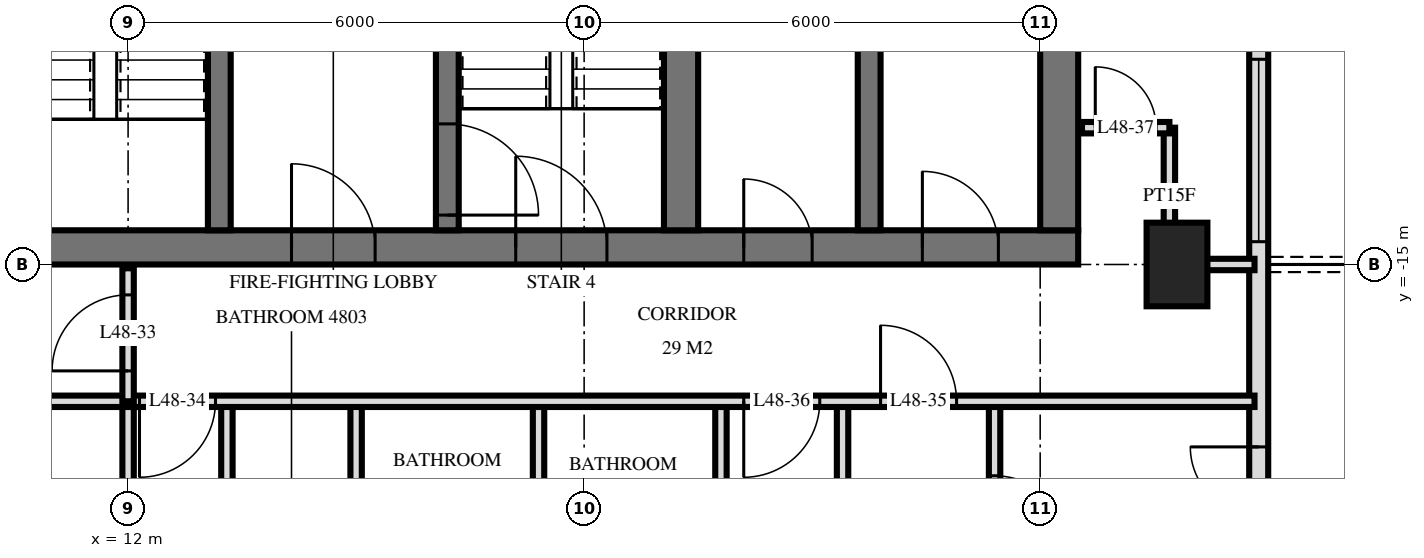
"""IFC4 building model, lengths in metres.
Left out: names, types, materials, properties, quantities, classifications, styles, units other than length and angle.
Written with IfcOpenShell. Run it as: python <this file> out.ifc"""

import sys

from ifc_helpers import new_model, si_unit, direction, frame, frame_2d, origin, origin_2d, place, context, subcontext, project, spatial, rectangle, extrude, element, fill, save


model = new_model("IFC4")
c1 = context("Model", 3, precision=1e-05, world=origin(), true_north=direction((0.0, 1.0)))
c2 = subcontext(c1, "Body", "Model", "MODEL_VIEW")
j1 = project(units=[si_unit("LENGTHUNIT", "METRE"), si_unit("PLANEANGLEUNIT", "RADIAN")], contexts=[c1])
p1 = place(None, origin())
s1 = spatial("IfcSite", under=j1, at=p1, CompositionType="ELEMENT")
p2 = place(p1, origin())
s2 = spatial("IfcBuilding", under=s1, at=p2, CompositionType="ELEMENT")
p3 = place(p2, frame((0.0, 0.0, 187.1)))
s3 = spatial("IfcBuildingStorey", under=s2, at=p3, CompositionType="ELEMENT", Elevation=187.1)
p4 = place(p3, frame((25.8, -15.0, 0.0), z_axis=(0.0, 0.0, 1.0), x_axis=(0.0, 1.0, 0.0)))
e1 = element("IfcColumn", 1, at=p4, inside=s3, PredefinedType="COLUMN", context=c2, shape_type="SweptSolid", body=[
    extrude(rectangle(XDim=1.1, YDim=0.8, at=origin_2d()), origin(), (0.0, 0.0, 1.0), 3.5),
])
p5 = place(p3, frame((10.0, -14.775, 0.0), z_axis=(0.0, 0.0, 1.0), x_axis=(1.0, 0.0, 0.0)))
e2 = element("IfcWall", 2, at=p5, inside=s3, PredefinedType="SHEAR", context=c2, shape_type="SweptSolid", body=[
    extrude(rectangle(XDim=14.5, YDim=0.45, at=frame_2d((7.25, 0.0))), origin(), (0.0, 0.0, 1.0), 3.5),
])
p6 = place(p5, frame((7.1, 0.0, 0.0)))
e3 = element("IfcOpeningElement", 3, at=p6, cuts=e2, PredefinedType="OPENING", context=c2, shape_type="SweptSolid", body=[
    extrude(rectangle(XDim=1.2, YDim=2.1, at=frame_2d((0.6, 1.05))), frame((0.0, 0.235, 0.0), z_axis=(0.0, -1.0, 0.0), x_axis=(1.0, 0.0, 0.0)), (0.0, 0.0, 1.0), 0.47),
])
p7 = place(p5, frame((4.15, 0.0, 0.0)))
e4 = element("IfcOpeningElement", 4, at=p7, cuts=e2, PredefinedType="OPENING", context=c2, shape_type="SweptSolid", body=[
    extrude(rectangle(XDim=1.1, YDim=2.1, at=frame_2d((0.55, 1.05))), frame((0.0, 0.235, 0.0), z_axis=(0.0, -1.0, 0.0), x_axis=(1.0, 0.0, 0.0)), (0.0, 0.0, 1.0), 0.47),
])
p8 = place(p5, frame((10.1, 0.0, 0.0)))
e5 = element("IfcOpeningElement", 5, at=p8, cuts=e2, PredefinedType="OPENING", context=c2, shape_type="SweptSolid", body=[
    extrude(rectangle(XDim=0.9, YDim=2.1, at=frame_2d((0.45, 1.05))), frame((0.0, 0.235, 0.0), z_axis=(0.0, -1.0, 0.0), x_axis=(1.0, 0.0, 0.0)), (0.0, 0.0, 1.0), 0.47),
])
p9 = place(p5, frame((12.45, 0.0, 0.0)))
e6 = element("IfcOpeningElement", 6, at=p9, cuts=e2, PredefinedType="OPENING", context=c2, shape_type="SweptSolid", body=[
    extrude(rectangle(XDim=1.0, YDim=2.1, at=frame_2d((0.5, 1.05))), frame((0.0, 0.235, 0.0), z_axis=(0.0, -1.0, 0.0), x_axis=(1.0, 0.0, 0.0)), (0.0, 0.0, 1.0), 0.47),
])
p10 = place(p3, frame((24.25, -14.55, 0.0), z_axis=(0.0, 0.0, 1.0), x_axis=(0.0, 1.0, 0.0)))
e7 = element("IfcWall", 7, at=p10, inside=s3, PredefinedType="SHEAR", context=c2, shape_type="SweptSolid", body=[
    extrude(rectangle(XDim=14.1, YDim=0.5, at=frame_2d((7.05, 0.0))), origin(), (0.0, 0.0, 1.0), 3.5),
])
p11 = place(p3, frame((13.2, -14.55, 0.0), z_axis=(0.0, 0.0, 1.0), x_axis=(0.0, 1.0, 0.0)))
e8 = element("IfcWall", 8, at=p11, inside=s3, PredefinedType="SHEAR", context=c2, shape_type="SweptSolid", body=[
    extrude(rectangle(XDim=5.4, YDim=0.3, at=frame_2d((2.7, 0.0))), origin(), (0.0, 0.0, 1.0), 3.5),
])
p12 = place(p11, frame((4.0, 0.0, 0.0)))
e9 = element("IfcOpeningElement", 9, at=p12, cuts=e8, PredefinedType="OPENING", context=c2, shape_type="SweptSolid", body=[
    extrude(rectangle(XDim=1.2, YDim=2.1, at=frame_2d((0.6, 1.05))), frame((0.0, 0.16, 0.0), z_axis=(0.0, -1.0, 0.0), x_axis=(1.0, 0.0, 0.0)), (0.0, 0.0, 1.0), 0.32),
])
p13 = place(p3, frame((16.2, -14.55, 0.0), z_axis=(0.0, 0.0, 1.0), x_axis=(0.0, 1.0, 0.0)))
e10 = element("IfcWall", 10, at=p13, inside=s3, PredefinedType="SHEAR", context=c2, shape_type="SweptSolid", body=[
    extrude(rectangle(XDim=5.4, YDim=0.3, at=frame_2d((2.7, 0.0))), origin(), (0.0, 0.0, 1.0), 3.5),
])
p14 = place(p13, frame((0.2, 0.0, 0.0)))
e11 = element("IfcOpeningElement", 11, at=p14, cuts=e10, PredefinedType="OPENING", context=c2, shape_type="SweptSolid", body=[
    extrude(rectangle(XDim=1.2, YDim=2.1, at=frame_2d((0.6, 1.05))), frame((0.0, 0.16, 0.0), z_axis=(0.0, -1.0, 0.0), x_axis=(1.0, 0.0, 0.0)), (0.0, 0.0, 1.0), 0.32),
])
p15 = place(p3, frame((19.275, -14.55, 0.0), z_axis=(0.0, 0.0, 1.0), x_axis=(0.0, 1.0, 0.0)))
e12 = element("IfcWall", 12, at=p15, inside=s3, PredefinedType="SHEAR", context=c2, shape_type="SweptSolid", body=[
    extrude(rectangle(XDim=5.4, YDim=0.45, at=frame_2d((2.7, 0.0))), origin(), (0.0, 0.0, 1.0), 3.5),
])
p16 = place(p3, frame((21.75, -14.55, 0.0), z_axis=(0.0, 0.0, 1.0), x_axis=(0.0, 1.0, 0.0)))
e13 = element("IfcWall", 13, at=p16, inside=s3, PredefinedType="SHEAR", context=c2, shape_type="SweptSolid", body=[
    extrude(rectangle(XDim=5.4, YDim=0.3, at=frame_2d((2.7, 0.0))), origin(), (0.0, 0.0, 1.0), 3.5),
])
p17 = place(p3, frame((26.875, -24.875, 0.0), z_axis=(0.0, 0.0, 1.0), x_axis=(0.0, 1.0, 0.0)))
e14 = element("IfcWall", 14, at=p17, inside=s3, PredefinedType="SOLIDWALL", context=c2, shape_type="SweptSolid", body=[
    extrude(rectangle(XDim=21.551, YDim=0.25, at=frame_2d((10.775, 0.0))), origin(), (0.0, 0.0, 1.0), 3.22),
])
p18 = place(p17, frame((0.575, 0.0, 0.0)))
e15 = element("IfcOpeningElement", 15, at=p18, cuts=e14, PredefinedType="OPENING", context=c2, shape_type="SweptSolid", body=[
    extrude(rectangle(XDim=1.8, YDim=2.4, at=frame_2d((0.9, 1.2))), frame((0.0, 0.135, 0.0), z_axis=(0.0, -1.0, 0.0), x_axis=(1.0, 0.0, 0.0)), (0.0, 0.0, 1.0), 0.27),
])
p19 = place(p17, frame((5.675, 0.0, 0.0)))
e16 = element("IfcOpeningElement", 16, at=p19, cuts=e14, PredefinedType="OPENING", context=c2, shape_type="SweptSolid", body=[
    extrude(rectangle(XDim=1.8, YDim=2.4, at=frame_2d((0.9, 1.2))), frame((0.0, 0.135, 0.0), z_axis=(0.0, -1.0, 0.0), x_axis=(1.0, 0.0, 0.0)), (0.0, 0.0, 1.0), 0.27),
])
p20 = place(p17, frame((10.175, 0.0, 0.9)))
e17 = element("IfcOpeningElement", 17, at=p20, cuts=e14, PredefinedType="OPENING", context=c2, shape_type="SweptSolid", body=[
    extrude(rectangle(XDim=2.4, YDim=1.5, at=frame_2d((1.2, 0.75))), frame((0.0, 0.135, 0.0), z_axis=(0.0, -1.0, 0.0), x_axis=(1.0, 0.0, 0.0)), (0.0, 0.0, 1.0), 0.27),
])
p21 = place(p17, frame((13.475, 0.0, 0.0)))
e18 = element("IfcOpeningElement", 18, at=p21, cuts=e14, PredefinedType="OPENING", context=c2, shape_type="SweptSolid", body=[
    extrude(rectangle(XDim=1.8, YDim=2.4, at=frame_2d((0.9, 1.2))), frame((0.0, 0.135, 0.0), z_axis=(0.0, -1.0, 0.0), x_axis=(1.0, 0.0, 0.0)), (0.0, 0.0, 1.0), 0.27),
])
p22 = place(p3, frame((25.7, -15.0, 0.0), z_axis=(0.0, 0.0, 1.0), x_axis=(0.0, 1.0, 0.0)))
e19 = element("IfcWall", 19, at=p22, inside=s3, PredefinedType="PARTITIONING", context=c2, shape_type="SweptSolid", body=[
    extrude(rectangle(XDim=1.8, YDim=0.15, at=frame_2d((0.9, 0.0))), origin(), (0.0, 0.0, 1.0), 3.22),
])
p23 = place(p3, frame((23.4, -19.8, 0.0), z_axis=(0.0, 0.0, 1.0), x_axis=(0.0, 1.0, 0.0)))
e20 = element("IfcWall", 20, at=p23, inside=s3, PredefinedType="PARTITIONING", context=c2, shape_type="SweptSolid", body=[
    extrude(rectangle(XDim=3.0, YDim=0.15, at=frame_2d((1.5, 0.0))), origin(), (0.0, 0.0, 1.0), 3.22),
])
p24 = place(p23, frame((1.02, 0.0, 0.0)))
e21 = element("IfcOpeningElement", 21, at=p24, cuts=e20, PredefinedType="OPENING", context=c2, shape_type="SweptSolid", body=[
    extrude(rectangle(XDim=1.0, YDim=2.1, at=frame_2d((0.5, 1.05))), frame((0.0, 0.085, 0.0), z_axis=(0.0, -1.0, 0.0), x_axis=(1.0, 0.0, 0.0)), (0.0, 0.0, 1.0), 0.17),
])
for number, where, z_axis, x_axis in (
    (22, (21.4, -19.8, 0.0), (0.0, 0.0, 1.0), (0.0, 1.0, 0.0)),
    (23, (19.8, -19.8, 0.0), (0.0, 0.0, 1.0), (0.0, 1.0, 0.0)),
    (24, (17.4, -19.8, 0.0), (0.0, 0.0, 1.0), (0.0, 1.0, 0.0)),
):
    element("IfcWall", number, at=place(p3, frame(where, z_axis=z_axis, x_axis=x_axis)), inside=s3, PredefinedType="PARTITIONING", context=c2, shape_type="SweptSolid", body=[
        extrude(rectangle(XDim=3.0, YDim=0.15, at=frame_2d((1.5, 0.0))), origin(), (0.0, 0.0, 1.0), 3.22),
    ])
p25 = place(p3, frame((15.0, -29.22, 0.0), z_axis=(0.0, 0.0, 1.0), x_axis=(0.0, 1.0, 0.0)))
e25 = element("IfcWall", 25, at=p25, inside=s3, PredefinedType="PARTITIONING", context=c2, shape_type="SweptSolid", body=[
    extrude(rectangle(XDim=12.42, YDim=0.15, at=frame_2d((6.21, 0.0))), origin(), (0.0, 0.0, 1.0), 3.22),
])
p26 = place(p3, frame((13.3, -19.8, 0.0), z_axis=(0.0, 0.0, 1.0), x_axis=(0.0, 1.0, 0.0)))
e26 = element("IfcWall", 26, at=p26, inside=s3, PredefinedType="PARTITIONING", context=c2, shape_type="SweptSolid", body=[
    extrude(rectangle(XDim=3.0, YDim=0.15, at=frame_2d((1.5, 0.0))), origin(), (0.0, 0.0, 1.0), 3.22),
])
p27 = place(p26, frame((1.1, 0.0, 0.0)))
e27 = element("IfcOpeningElement", 27, at=p27, cuts=e26, PredefinedType="OPENING", context=c2, shape_type="SweptSolid", body=[
    extrude(rectangle(XDim=0.8, YDim=2.1, at=frame_2d((0.4, 1.05))), frame((0.0, 0.085, 0.0), z_axis=(0.0, -1.0, 0.0), x_axis=(1.0, 0.0, 0.0)), (0.0, 0.0, 1.0), 0.17),
])
p28 = place(p3, frame((12.0, -16.8, 0.0), z_axis=(0.0, 0.0, 1.0), x_axis=(0.0, 1.0, 0.0)))
e28 = element("IfcWall", 28, at=p28, inside=s3, PredefinedType="PARTITIONING", context=c2, shape_type="SweptSolid", body=[
    extrude(rectangle(XDim=1.75, YDim=0.15, at=frame_2d((0.875, 0.0))), origin(), (0.0, 0.0, 1.0), 3.22),
])
p29 = place(p28, frame((0.4, 0.0, 0.0)))
e29 = element("IfcOpeningElement", 29, at=p29, cuts=e28, PredefinedType="OPENING", context=c2, shape_type="SweptSolid", body=[
    extrude(rectangle(XDim=1.0, YDim=2.1, at=frame_2d((0.5, 1.05))), frame((0.0, 0.085, 0.0), z_axis=(0.0, -1.0, 0.0), x_axis=(1.0, 0.0, 0.0)), (0.0, 0.0, 1.0), 0.17),
])
p30 = place(p3, frame((12.0, -29.22, 0.0), z_axis=(0.0, 0.0, 1.0), x_axis=(0.0, 1.0, 0.0)))
e30 = element("IfcWall", 30, at=p30, inside=s3, PredefinedType="PARTITIONING", context=c2, shape_type="SweptSolid", body=[
    extrude(rectangle(XDim=12.42, YDim=0.15, at=frame_2d((6.21, 0.0))), origin(), (0.0, 0.0, 1.0), 3.22),
])
p31 = place(p3, frame((-26.82, -16.8, 0.0), z_axis=(0.0, 0.0, 1.0), x_axis=(1.0, 0.0, 0.0)))
e31 = element("IfcWall", 31, at=p31, inside=s3, PredefinedType="PARTITIONING", context=c2, shape_type="SweptSolid", body=[
    extrude(rectangle(XDim=53.64, YDim=0.15, at=frame_2d((26.82, 0.0))), origin(), (0.0, 0.0, 1.0), 3.22),
])
p32 = place(p31, frame((11.97, 0.0, 0.0)))
e32 = element("IfcOpeningElement", 32, at=p32, cuts=e31, PredefinedType="OPENING", context=c2, shape_type="SweptSolid", body=[
    extrude(rectangle(XDim=1.0, YDim=2.1, at=frame_2d((0.5, 1.05))), frame((0.0, 0.085, 0.0), z_axis=(0.0, -1.0, 0.0), x_axis=(1.0, 0.0, 0.0)), (0.0, 0.0, 1.0), 0.17),
])
p33 = place(p31, frame((10.67, 0.0, 0.0)))
e33 = element("IfcOpeningElement", 33, at=p33, cuts=e31, PredefinedType="OPENING", context=c2, shape_type="SweptSolid", body=[
    extrude(rectangle(XDim=1.0, YDim=2.1, at=frame_2d((0.5, 1.05))), frame((0.0, 0.085, 0.0), z_axis=(0.0, -1.0, 0.0), x_axis=(1.0, 0.0, 0.0)), (0.0, 0.0, 1.0), 0.17),
])
p34 = place(p31, frame((3.22, 0.0, 0.0)))
e34 = element("IfcOpeningElement", 34, at=p34, cuts=e31, PredefinedType="OPENING", context=c2, shape_type="SweptSolid", body=[
    extrude(rectangle(XDim=1.0, YDim=2.1, at=frame_2d((0.5, 1.05))), frame((0.0, 0.085, 0.0), z_axis=(0.0, -1.0, 0.0), x_axis=(1.0, 0.0, 0.0)), (0.0, 0.0, 1.0), 0.17),
])
p35 = place(p31, frame((5.02, 0.0, 0.0)))
e35 = element("IfcOpeningElement", 35, at=p35, cuts=e31, PredefinedType="OPENING", context=c2, shape_type="SweptSolid", body=[
    extrude(rectangle(XDim=1.0, YDim=2.1, at=frame_2d((0.5, 1.05))), frame((0.0, 0.085, 0.0), z_axis=(0.0, -1.0, 0.0), x_axis=(1.0, 0.0, 0.0)), (0.0, 0.0, 1.0), 0.17),
])
p36 = place(p31, frame((38.97, 0.0, 0.0)))
e36 = element("IfcOpeningElement", 36, at=p36, cuts=e31, PredefinedType="OPENING", context=c2, shape_type="SweptSolid", body=[
    extrude(rectangle(XDim=1.0, YDim=2.1, at=frame_2d((0.5, 1.05))), frame((0.0, 0.085, 0.0), z_axis=(0.0, -1.0, 0.0), x_axis=(1.0, 0.0, 0.0)), (0.0, 0.0, 1.0), 0.17),
])
p37 = place(p31, frame((48.72, 0.0, 0.0)))
e37 = element("IfcOpeningElement", 37, at=p37, cuts=e31, PredefinedType="OPENING", context=c2, shape_type="SweptSolid", body=[
    extrude(rectangle(XDim=1.0, YDim=2.1, at=frame_2d((0.5, 1.05))), frame((0.0, 0.085, 0.0), z_axis=(0.0, -1.0, 0.0), x_axis=(1.0, 0.0, 0.0)), (0.0, 0.0, 1.0), 0.17),
])
p38 = place(p31, frame((46.92, 0.0, 0.0)))
e38 = element("IfcOpeningElement", 38, at=p38, cuts=e31, PredefinedType="OPENING", context=c2, shape_type="SweptSolid", body=[
    extrude(rectangle(XDim=1.0, YDim=2.1, at=frame_2d((0.5, 1.05))), frame((0.0, 0.085, 0.0), z_axis=(0.0, -1.0, 0.0), x_axis=(1.0, 0.0, 0.0)), (0.0, 0.0, 1.0), 0.17),
])
p39 = place(p31, frame((18.32, 0.0, 0.0)))
e39 = element("IfcOpeningElement", 39, at=p39, cuts=e31, PredefinedType="OPENING", context=c2, shape_type="SweptSolid", body=[
    extrude(rectangle(XDim=1.0, YDim=2.1, at=frame_2d((0.5, 1.05))), frame((0.0, 0.085, 0.0), z_axis=(0.0, -1.0, 0.0), x_axis=(1.0, 0.0, 0.0)), (0.0, 0.0, 1.0), 0.17),
])
p40 = place(p31, frame((26.32, 0.0, 0.0)))
e40 = element("IfcOpeningElement", 40, at=p40, cuts=e31, PredefinedType="OPENING", context=c2, shape_type="SweptSolid", body=[
    extrude(rectangle(XDim=1.0, YDim=2.1, at=frame_2d((0.5, 1.05))), frame((0.0, 0.085, 0.0), z_axis=(0.0, -1.0, 0.0), x_axis=(1.0, 0.0, 0.0)), (0.0, 0.0, 1.0), 0.17),
])
p41 = place(p31, frame((34.32, 0.0, 0.0)))
e41 = element("IfcOpeningElement", 41, at=p41, cuts=e31, PredefinedType="OPENING", context=c2, shape_type="SweptSolid", body=[
    extrude(rectangle(XDim=1.0, YDim=2.1, at=frame_2d((0.5, 1.05))), frame((0.0, 0.085, 0.0), z_axis=(0.0, -1.0, 0.0), x_axis=(1.0, 0.0, 0.0)), (0.0, 0.0, 1.0), 0.17),
])
p42 = place(p3, frame((25.7, -15.0, 0.0), z_axis=(0.0, 0.0, 1.0), x_axis=(1.0, 0.0, 0.0)))
e42 = element("IfcWall", 42, at=p42, inside=s3, PredefinedType="PARTITIONING", context=c2, shape_type="SweptSolid", body=[
    extrude(rectangle(XDim=1.12, YDim=0.15, at=frame_2d((0.56, 0.0))), origin(), (0.0, 0.0, 1.0), 3.22),
])
p43 = place(p3, frame((24.55, -13.2, 0.0), z_axis=(0.0, 0.0, 1.0), x_axis=(1.0, 0.0, 0.0)))
e43 = element("IfcWall", 43, at=p43, inside=s3, PredefinedType="PARTITIONING", context=c2, shape_type="SweptSolid", body=[
    extrude(rectangle(XDim=1.15, YDim=0.15, at=frame_2d((0.575, 0.0))), origin(), (0.0, 0.0, 1.0), 3.22),
])
p44 = place(p43, frame((0.175, 0.0, 0.0)))
e44 = element("IfcOpeningElement", 44, at=p44, cuts=e43, PredefinedType="OPENING", context=c2, shape_type="SweptSolid", body=[
    extrude(rectangle(XDim=0.8, YDim=2.1, at=frame_2d((0.4, 1.05))), frame((0.0, 0.085, 0.0), z_axis=(0.0, -1.0, 0.0), x_axis=(1.0, 0.0, 0.0)), (0.0, 0.0, 1.0), 0.17),
])
p45 = place(p19, origin())
e45 = element("IfcDoor", 45, at=p45, inside=s3, OperationType="DOUBLE_DOOR_SINGLE_SWING", PredefinedType="DOOR", context=c2, shape_type="SweptSolid", body=[
    extrude(rectangle(XDim=1.8, YDim=2.4, at=frame_2d((0.9, 1.2))), frame((0.0, 0.025, 0.0), z_axis=(0.0, -1.0, 0.0), x_axis=(1.0, 0.0, 0.0)), (0.0, 0.0, 1.0), 0.05),
])
fill(e16, e45)
p46 = place(p20, origin())
e46 = element("IfcWindow", 46, at=p46, inside=s3, PartitioningType="SINGLE_PANEL", PredefinedType="WINDOW", context=c2, shape_type="SweptSolid", body=[
    extrude(rectangle(XDim=2.4, YDim=1.5, at=frame_2d((1.2, 0.75))), frame((0.0, 0.03, 0.0), z_axis=(0.0, -1.0, 0.0), x_axis=(1.0, 0.0, 0.0)), (0.0, 0.0, 1.0), 0.06),
])
fill(e17, e46)
p47 = place(p6, origin())
e47 = element("IfcDoor", 47, at=p47, inside=s3, OperationType="SINGLE_SWING_RIGHT", PredefinedType="DOOR", context=c2, shape_type="SweptSolid", body=[
    extrude(rectangle(XDim=1.2, YDim=2.1, at=frame_2d((0.6, 1.05))), frame((0.0, 0.025, 0.0), z_axis=(0.0, -1.0, 0.0), x_axis=(1.0, 0.0, 0.0)), (0.0, 0.0, 1.0), 0.05),
])
fill(e3, e47)
p48 = place(p7, origin())
e48 = element("IfcDoor", 48, at=p48, inside=s3, OperationType="SINGLE_SWING_RIGHT", PredefinedType="DOOR", context=c2, shape_type="SweptSolid", body=[
    extrude(rectangle(XDim=1.1, YDim=2.1, at=frame_2d((0.55, 1.05))), frame((0.0, 0.025, 0.0), z_axis=(0.0, -1.0, 0.0), x_axis=(1.0, 0.0, 0.0)), (0.0, 0.0, 1.0), 0.05),
])
fill(e4, e48)
p49 = place(p8, origin())
e49 = element("IfcDoor", 49, at=p49, inside=s3, OperationType="SINGLE_SWING_RIGHT", PredefinedType="DOOR", context=c2, shape_type="SweptSolid", body=[
    extrude(rectangle(XDim=0.9, YDim=2.1, at=frame_2d((0.45, 1.05))), frame((0.0, 0.025, 0.0), z_axis=(0.0, -1.0, 0.0), x_axis=(1.0, 0.0, 0.0)), (0.0, 0.0, 1.0), 0.05),
])
fill(e5, e49)
p50 = place(p9, origin())
e50 = element("IfcDoor", 50, at=p50, inside=s3, OperationType="SINGLE_SWING_RIGHT", PredefinedType="DOOR", context=c2, shape_type="SweptSolid", body=[
    extrude(rectangle(XDim=1.0, YDim=2.1, at=frame_2d((0.5, 1.05))), frame((0.0, 0.025, 0.0), z_axis=(0.0, -1.0, 0.0), x_axis=(1.0, 0.0, 0.0)), (0.0, 0.0, 1.0), 0.05),
])
fill(e6, e50)
p51 = place(p14, frame((0.6, 0.0, 0.0), z_axis=(0.0, 0.0, 1.0), x_axis=(-1.0, 0.0, 0.0)))
e51 = element("IfcDoor", 51, at=p51, inside=s3, OperationType="SINGLE_SWING_LEFT", PredefinedType="DOOR", context=c2, shape_type="SweptSolid", body=[
    extrude(rectangle(XDim=1.2, YDim=2.1, at=frame_2d((0.0, 1.05))), frame((0.0, -0.025, 0.0), z_axis=(0.0, 1.0, 0.0), x_axis=(-1.0, 0.0, 0.0)), (0.0, 0.0, 1.0), 0.05),
])
fill(e11, e51)
p52 = place(p29, origin())
e52 = element("IfcDoor", 52, at=p52, inside=s3, OperationType="SINGLE_SWING_RIGHT", PredefinedType="DOOR", context=c2, shape_type="SweptSolid", body=[
    extrude(rectangle(XDim=1.0, YDim=2.1, at=frame_2d((0.5, 1.05))), frame((0.0, 0.025, 0.0), z_axis=(0.0, -1.0, 0.0), x_axis=(1.0, 0.0, 0.0)), (0.0, 0.0, 1.0), 0.05),
])
fill(e29, e52)
p53 = place(p36, frame((0.5, 0.0, 0.0), z_axis=(0.0, 0.0, 1.0), x_axis=(-1.0, 0.0, 0.0)))
e53 = element("IfcDoor", 53, at=p53, inside=s3, OperationType="SINGLE_SWING_LEFT", PredefinedType="DOOR", context=c2, shape_type="SweptSolid", body=[
    extrude(rectangle(XDim=1.0, YDim=2.1, at=frame_2d((0.0, 1.05))), frame((0.0, -0.025, 0.0), z_axis=(0.0, 1.0, 0.0), x_axis=(-1.0, 0.0, 0.0)), (0.0, 0.0, 1.0), 0.05),
])
fill(e36, e53)
p54 = place(p37, origin())
e54 = element("IfcDoor", 54, at=p54, inside=s3, OperationType="SINGLE_SWING_RIGHT", PredefinedType="DOOR", context=c2, shape_type="SweptSolid", body=[
    extrude(rectangle(XDim=1.0, YDim=2.1, at=frame_2d((0.5, 1.05))), frame((0.0, 0.025, 0.0), z_axis=(0.0, -1.0, 0.0), x_axis=(1.0, 0.0, 0.0)), (0.0, 0.0, 1.0), 0.05),
])
fill(e37, e54)
p55 = place(p38, frame((0.5, 0.0, 0.0), z_axis=(0.0, 0.0, 1.0), x_axis=(-1.0, 0.0, 0.0)))
e55 = element("IfcDoor", 55, at=p55, inside=s3, OperationType="SINGLE_SWING_LEFT", PredefinedType="DOOR", context=c2, shape_type="SweptSolid", body=[
    extrude(rectangle(XDim=1.0, YDim=2.1, at=frame_2d((0.0, 1.05))), frame((0.0, -0.025, 0.0), z_axis=(0.0, 1.0, 0.0), x_axis=(-1.0, 0.0, 0.0)), (0.0, 0.0, 1.0), 0.05),
])
fill(e38, e55)
p56 = place(p44, origin())
e56 = element("IfcDoor", 56, at=p56, inside=s3, OperationType="SINGLE_SWING_RIGHT", PredefinedType="DOOR", context=c2, shape_type="SweptSolid", body=[
    extrude(rectangle(XDim=0.8, YDim=2.1, at=frame_2d((0.4, 1.05))), frame((0.0, 0.025, 0.0), z_axis=(0.0, -1.0, 0.0), x_axis=(1.0, 0.0, 0.0)), (0.0, 0.0, 1.0), 0.05),
])
fill(e44, e56)
p57 = place(p24, frame((0.5, 0.0, 0.0), z_axis=(0.0, 0.0, 1.0), x_axis=(-1.0, 0.0, 0.0)))
e57 = element("IfcDoor", 57, at=p57, inside=s3, OperationType="SINGLE_SWING_LEFT", PredefinedType="DOOR", context=c2, shape_type="SweptSolid", body=[
    extrude(rectangle(XDim=1.0, YDim=2.1, at=frame_2d((0.0, 1.05))), frame((0.0, -0.025, 0.0), z_axis=(0.0, 1.0, 0.0), x_axis=(-1.0, 0.0, 0.0)), (0.0, 0.0, 1.0), 0.05),
])
fill(e21, e57)
save(model, sys.argv[1])
